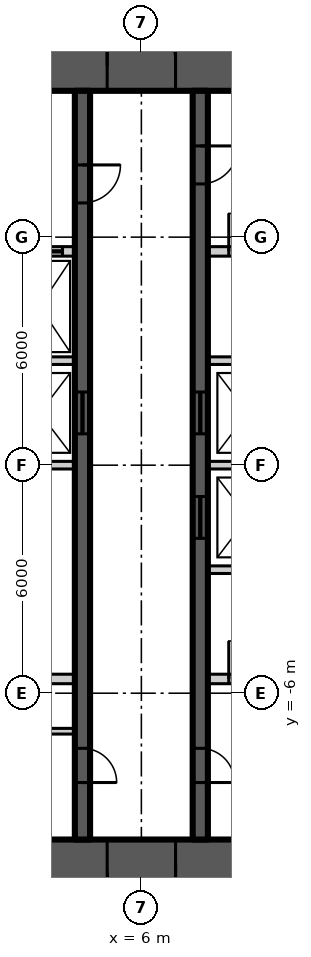
"""IFC4 building model, lengths in metres.
Left out: names, types, materials, properties, quantities, classifications, styles, units other than length and angle.
Written with IfcOpenShell. Run it as: python <this file> out.ifc"""

import sys

from ifc_helpers import new_model, si_unit, direction, frame, frame_2d, origin, place, context, subcontext, project, spatial, rectangle, extrude, element, fill, save


model = new_model("IFC4")
c1 = context("Model", 3, precision=1e-05, world=origin(), true_north=direction((0.0, 1.0)))
c2 = subcontext(c1, "Body", "Model", "MODEL_VIEW")
j1 = project(units=[si_unit("LENGTHUNIT", "METRE"), si_unit("PLANEANGLEUNIT", "RADIAN")], contexts=[c1])
p1 = place(None, origin())
s1 = spatial("IfcSite", under=j1, at=p1, CompositionType="ELEMENT")
p2 = place(p1, origin())
s2 = spatial("IfcBuilding", under=s1, at=p2, CompositionType="ELEMENT")
p3 = place(p2, frame((0.0, 0.0, 290.7)))
s3 = spatial("IfcBuildingStorey", under=s2, at=p3, CompositionType="ELEMENT", Elevation=290.7)
p4 = place(p3, frame((-11.15, 10.5, 0.0), z_axis=(0.0, 0.0, 1.0), x_axis=(1.0, 0.0, 0.0)))
e1 = element("IfcWall", 1, at=p4, inside=s3, PredefinedType="SHEAR", context=c2, shape_type="SweptSolid", body=[
    extrude(rectangle(XDim=22.3, YDim=1.3, at=frame_2d((11.15, 0.0))), origin(), (0.0, 0.0, 1.0), 3.9),
])
p5 = place(p4, frame((4.25, 0.0, 0.0)))
e2 = element("IfcOpeningElement", 2, at=p5, cuts=e1, PredefinedType="OPENING", context=c2, shape_type="SweptSolid", body=[
    extrude(rectangle(XDim=1.8, YDim=2.2, at=frame_2d((0.9, 1.1))), frame((0.0, 0.66, 0.0), z_axis=(0.0, -1.0, 0.0), x_axis=(1.0, 0.0, 0.0)), (0.0, 0.0, 1.0), 1.32),
])
p6 = place(p4, frame((16.25, 0.0, 0.0)))
e3 = element("IfcOpeningElement", 3, at=p6, cuts=e1, PredefinedType="OPENING", context=c2, shape_type="SweptSolid", body=[
    extrude(rectangle(XDim=1.8, YDim=2.2, at=frame_2d((0.9, 1.1))), frame((0.0, 0.66, 0.0), z_axis=(0.0, -1.0, 0.0), x_axis=(1.0, 0.0, 0.0)), (0.0, 0.0, 1.0), 1.32),
])
p7 = place(p3, frame((11.15, -10.5, 0.0), z_axis=(0.0, 0.0, 1.0), x_axis=(-1.0, 0.0, 0.0)))
e4 = element("IfcWall", 4, at=p7, inside=s3, PredefinedType="SHEAR", context=c2, shape_type="SweptSolid", body=[
    extrude(rectangle(XDim=22.3, YDim=1.3, at=frame_2d((11.15, 0.0))), origin(), (0.0, 0.0, 1.0), 3.9),
])
p8 = place(p7, frame((16.25, 0.0, 0.0)))
e5 = element("IfcOpeningElement", 5, at=p8, cuts=e4, PredefinedType="OPENING", context=c2, shape_type="SweptSolid", body=[
    extrude(rectangle(XDim=1.8, YDim=2.2, at=frame_2d((0.9, 1.1))), frame((0.0, 0.66, 0.0), z_axis=(0.0, -1.0, 0.0), x_axis=(1.0, 0.0, 0.0)), (0.0, 0.0, 1.0), 1.32),
])
p9 = place(p7, frame((4.25, 0.0, 0.0)))
e6 = element("IfcOpeningElement", 6, at=p9, cuts=e4, PredefinedType="OPENING", context=c2, shape_type="SweptSolid", body=[
    extrude(rectangle(XDim=1.8, YDim=2.2, at=frame_2d((0.9, 1.1))), frame((0.0, 0.66, 0.0), z_axis=(0.0, -1.0, 0.0), x_axis=(1.0, 0.0, 0.0)), (0.0, 0.0, 1.0), 1.32),
])
p10 = place(p3, frame((7.55, 9.85, 0.0), z_axis=(0.0, 0.0, 1.0), x_axis=(0.0, -1.0, 0.0)))
e7 = element("IfcWall", 7, at=p10, inside=s3, PredefinedType="SHEAR", context=c2, shape_type="SweptSolid", body=[
    extrude(rectangle(XDim=19.7, YDim=0.4, at=frame_2d((9.85, 0.0))), origin(), (0.0, 0.0, 1.0), 3.9),
])
p11 = place(p10, frame((1.45, 0.0, 0.0)))
e8 = element("IfcOpeningElement", 8, at=p11, cuts=e7, PredefinedType="OPENING", context=c2, shape_type="SweptSolid", body=[
    extrude(rectangle(XDim=1.0, YDim=2.2, at=frame_2d((0.5, 1.1))), frame((0.0, 0.21, 0.0), z_axis=(0.0, -1.0, 0.0), x_axis=(1.0, 0.0, 0.0)), (0.0, 0.0, 1.0), 0.42),
])
p12 = place(p10, frame((17.3, 0.0, 0.0)))
e9 = element("IfcOpeningElement", 9, at=p12, cuts=e7, PredefinedType="OPENING", context=c2, shape_type="SweptSolid", body=[
    extrude(rectangle(XDim=0.9, YDim=2.1, at=frame_2d((0.45, 1.05))), frame((0.0, 0.21, 0.0), z_axis=(0.0, -1.0, 0.0), x_axis=(1.0, 0.0, 0.0)), (0.0, 0.0, 1.0), 0.42),
])
p13 = place(p10, frame((7.925, 0.0, 0.0)))
e10 = element("IfcOpeningElement", 10, at=p13, cuts=e7, PredefinedType="OPENING", context=c2, shape_type="SweptSolid", body=[
    extrude(rectangle(XDim=1.1, YDim=2.2, at=frame_2d((0.55, 1.1))), frame((0.0, 0.21, 0.0), z_axis=(0.0, -1.0, 0.0), x_axis=(1.0, 0.0, 0.0)), (0.0, 0.0, 1.0), 0.42),
])
p14 = place(p10, frame((10.675, 0.0, 0.0)))
e11 = element("IfcOpeningElement", 11, at=p14, cuts=e7, PredefinedType="OPENING", context=c2, shape_type="SweptSolid", body=[
    extrude(rectangle(XDim=1.1, YDim=2.2, at=frame_2d((0.55, 1.1))), frame((0.0, 0.21, 0.0), z_axis=(0.0, -1.0, 0.0), x_axis=(1.0, 0.0, 0.0)), (0.0, 0.0, 1.0), 0.42),
])
p15 = place(p3, frame((4.45, 9.85, 0.0), z_axis=(0.0, 0.0, 1.0), x_axis=(0.0, -1.0, 0.0)))
e12 = element("IfcWall", 12, at=p15, inside=s3, PredefinedType="SHEAR", context=c2, shape_type="SweptSolid", body=[
    extrude(rectangle(XDim=19.7, YDim=0.4, at=frame_2d((9.85, 0.0))), origin(), (0.0, 0.0, 1.0), 3.9),
])
p16 = place(p15, frame((1.95, 0.0, 0.0)))
e13 = element("IfcOpeningElement", 13, at=p16, cuts=e12, PredefinedType="OPENING", context=c2, shape_type="SweptSolid", body=[
    extrude(rectangle(XDim=1.0, YDim=2.2, at=frame_2d((0.5, 1.1))), frame((0.0, 0.21, 0.0), z_axis=(0.0, -1.0, 0.0), x_axis=(1.0, 0.0, 0.0)), (0.0, 0.0, 1.0), 0.42),
])
p17 = place(p15, frame((17.3, 0.0, 0.0)))
e14 = element("IfcOpeningElement", 14, at=p17, cuts=e12, PredefinedType="OPENING", context=c2, shape_type="SweptSolid", body=[
    extrude(rectangle(XDim=0.9, YDim=2.1, at=frame_2d((0.45, 1.05))), frame((0.0, 0.21, 0.0), z_axis=(0.0, -1.0, 0.0), x_axis=(1.0, 0.0, 0.0)), (0.0, 0.0, 1.0), 0.42),
])
p18 = place(p15, frame((7.925, 0.0, 0.0)))
e15 = element("IfcOpeningElement", 15, at=p18, cuts=e12, PredefinedType="OPENING", context=c2, shape_type="SweptSolid", body=[
    extrude(rectangle(XDim=1.1, YDim=2.2, at=frame_2d((0.55, 1.1))), frame((0.0, 0.21, 0.0), z_axis=(0.0, -1.0, 0.0), x_axis=(1.0, 0.0, 0.0)), (0.0, 0.0, 1.0), 0.42),
])
p19 = place(p3, frame((2.4, 5.625, 0.0), z_axis=(0.0, 0.0, 1.0), x_axis=(1.0, 0.0, 0.0)))
e16 = element("IfcWall", 16, at=p19, inside=s3, PredefinedType="SOLIDWALL", context=c2, shape_type="SweptSolid", body=[
    extrude(rectangle(XDim=1.85, YDim=0.25, at=frame_2d((0.925, 0.0))), origin(), (0.0, 0.0, 1.0), 3.7),
])
p20 = place(p19, frame((0.325, 0.0, 0.0)))
e17 = element("IfcOpeningElement", 17, at=p20, cuts=e16, PredefinedType="OPENING", context=c2, shape_type="SweptSolid", body=[
    extrude(rectangle(XDim=1.2, YDim=2.2, at=frame_2d((0.6, 1.1))), frame((0.0, 0.135, 0.0), z_axis=(0.0, -1.0, 0.0), x_axis=(1.0, 0.0, 0.0)), (0.0, 0.0, 1.0), 0.27),
])
p21 = place(p3, frame((7.75, 5.625, 0.0), z_axis=(0.0, 0.0, 1.0), x_axis=(1.0, 0.0, 0.0)))
e18 = element("IfcWall", 18, at=p21, inside=s3, PredefinedType="SOLIDWALL", context=c2, shape_type="SweptSolid", body=[
    extrude(rectangle(XDim=2.1, YDim=0.25, at=frame_2d((1.05, 0.0))), origin(), (0.0, 0.0, 1.0), 3.7),
])
p22 = place(p21, frame((0.55, 0.0, 0.0)))
e19 = element("IfcOpeningElement", 19, at=p22, cuts=e18, PredefinedType="OPENING", context=c2, shape_type="SweptSolid", body=[
    extrude(rectangle(XDim=1.0, YDim=2.2, at=frame_2d((0.5, 1.1))), frame((0.0, 0.135, 0.0), z_axis=(0.0, -1.0, 0.0), x_axis=(1.0, 0.0, 0.0)), (0.0, 0.0, 1.0), 0.27),
])
p23 = place(p3, frame((2.4, -5.625, 0.0), z_axis=(0.0, 0.0, 1.0), x_axis=(1.0, 0.0, 0.0)))
e20 = element("IfcWall", 20, at=p23, inside=s3, PredefinedType="SOLIDWALL", context=c2, shape_type="SweptSolid", body=[
    extrude(rectangle(XDim=1.85, YDim=0.25, at=frame_2d((0.925, 0.0))), origin(), (0.0, 0.0, 1.0), 3.7),
])
p24 = place(p3, frame((7.75, -5.625, 0.0), z_axis=(0.0, 0.0, 1.0), x_axis=(1.0, 0.0, 0.0)))
e21 = element("IfcWall", 21, at=p24, inside=s3, PredefinedType="SOLIDWALL", context=c2, shape_type="SweptSolid", body=[
    extrude(rectangle(XDim=2.1, YDim=0.25, at=frame_2d((1.05, 0.0))), origin(), (0.0, 0.0, 1.0), 3.7),
])
p25 = place(p24, frame((0.55, 0.0, 0.0)))
e22 = element("IfcOpeningElement", 22, at=p25, cuts=e21, PredefinedType="OPENING", context=c2, shape_type="SweptSolid", body=[
    extrude(rectangle(XDim=1.0, YDim=2.2, at=frame_2d((0.5, 1.1))), frame((0.0, 0.135, 0.0), z_axis=(0.0, -1.0, 0.0), x_axis=(1.0, 0.0, 0.0)), (0.0, 0.0, 1.0), 0.27),
])
p26 = place(p3, frame((7.75, -2.75, 0.0), z_axis=(0.0, 0.0, 1.0), x_axis=(1.0, 0.0, 0.0)))
e23 = element("IfcWall", 23, at=p26, inside=s3, PredefinedType="SOLIDWALL", context=c2, shape_type="SweptSolid", body=[
    extrude(rectangle(XDim=2.1, YDim=0.2, at=frame_2d((1.05, 0.0))), origin(), (0.0, 0.0, 1.0), 3.7),
])
p27 = place(p3, frame((2.4, 0.0, 0.0), z_axis=(0.0, 0.0, 1.0), x_axis=(1.0, 0.0, 0.0)))
e24 = element("IfcWall", 24, at=p27, inside=s3, PredefinedType="SOLIDWALL", context=c2, shape_type="SweptSolid", body=[
    extrude(rectangle(XDim=1.85, YDim=0.2, at=frame_2d((0.925, 0.0))), origin(), (0.0, 0.0, 1.0), 3.7),
])
p28 = place(p3, frame((7.75, 0.0, 0.0), z_axis=(0.0, 0.0, 1.0), x_axis=(1.0, 0.0, 0.0)))
e25 = element("IfcWall", 25, at=p28, inside=s3, PredefinedType="SOLIDWALL", context=c2, shape_type="SweptSolid", body=[
    extrude(rectangle(XDim=2.1, YDim=0.2, at=frame_2d((1.05, 0.0))), origin(), (0.0, 0.0, 1.0), 3.7),
])
p29 = place(p3, frame((2.4, 2.75, 0.0), z_axis=(0.0, 0.0, 1.0), x_axis=(1.0, 0.0, 0.0)))
e26 = element("IfcWall", 26, at=p29, inside=s3, PredefinedType="SOLIDWALL", context=c2, shape_type="SweptSolid", body=[
    extrude(rectangle(XDim=1.85, YDim=0.2, at=frame_2d((0.925, 0.0))), origin(), (0.0, 0.0, 1.0), 3.7),
])
p30 = place(p3, frame((7.75, 2.75, 0.0), z_axis=(0.0, 0.0, 1.0), x_axis=(1.0, 0.0, 0.0)))
e27 = element("IfcWall", 27, at=p30, inside=s3, PredefinedType="SOLIDWALL", context=c2, shape_type="SweptSolid", body=[
    extrude(rectangle(XDim=2.1, YDim=0.2, at=frame_2d((1.05, 0.0))), origin(), (0.0, 0.0, 1.0), 3.7),
])
p31 = place(p3, frame((2.4, -7.0, 0.0), z_axis=(0.0, 0.0, 1.0), x_axis=(1.0, 0.0, 0.0)))
e28 = element("IfcWall", 28, at=p31, inside=s3, PredefinedType="SOLIDWALL", context=c2, shape_type="SweptSolid", body=[
    extrude(rectangle(XDim=1.85, YDim=0.15, at=frame_2d((0.925, 0.0))), origin(), (0.0, 0.0, 1.0), 3.77),
])
p32 = place(p31, frame((0.1, 0.0, 0.0)))
e29 = element("IfcOpeningElement", 29, at=p32, cuts=e28, PredefinedType="OPENING", context=c2, shape_type="SweptSolid", body=[
    extrude(rectangle(XDim=0.9, YDim=2.1, at=frame_2d((0.45, 1.05))), frame((0.0, 0.085, 0.0), z_axis=(0.0, -1.0, 0.0), x_axis=(1.0, 0.0, 0.0)), (0.0, 0.0, 1.0), 0.17),
])
p33 = place(p6, origin())
e30 = element("IfcDoor", 30, at=p33, inside=s3, OperationType="DOUBLE_DOOR_DOUBLE_SWING", PredefinedType="DOOR", context=c2, shape_type="SweptSolid", body=[
    extrude(rectangle(XDim=1.8, YDim=2.2, at=frame_2d((0.9, 1.1))), frame((0.0, 0.025, 0.0), z_axis=(0.0, -1.0, 0.0), x_axis=(1.0, 0.0, 0.0)), (0.0, 0.0, 1.0), 0.05),
])
fill(e3, e30)
p34 = place(p9, origin())
e31 = element("IfcDoor", 31, at=p34, inside=s3, OperationType="DOUBLE_DOOR_DOUBLE_SWING", PredefinedType="DOOR", context=c2, shape_type="SweptSolid", body=[
    extrude(rectangle(XDim=1.8, YDim=2.2, at=frame_2d((0.9, 1.1))), frame((0.0, 0.025, 0.0), z_axis=(0.0, -1.0, 0.0), x_axis=(1.0, 0.0, 0.0)), (0.0, 0.0, 1.0), 0.05),
])
fill(e6, e31)
p35 = place(p11, origin())
e32 = element("IfcDoor", 32, at=p35, inside=s3, OperationType="SINGLE_SWING_LEFT", PredefinedType="DOOR", context=c2, shape_type="SweptSolid", body=[
    extrude(rectangle(XDim=1.0, YDim=2.2, at=frame_2d((0.5, 1.1))), frame((0.0, 0.025, 0.0), z_axis=(0.0, -1.0, 0.0), x_axis=(1.0, 0.0, 0.0)), (0.0, 0.0, 1.0), 0.05),
])
fill(e8, e32)
p36 = place(p16, origin())
e33 = element("IfcDoor", 33, at=p36, inside=s3, OperationType="SINGLE_SWING_LEFT", PredefinedType="DOOR", context=c2, shape_type="SweptSolid", body=[
    extrude(rectangle(XDim=1.0, YDim=2.2, at=frame_2d((0.5, 1.1))), frame((0.0, 0.025, 0.0), z_axis=(0.0, -1.0, 0.0), x_axis=(1.0, 0.0, 0.0)), (0.0, 0.0, 1.0), 0.05),
])
fill(e13, e33)
p37 = place(p12, origin())
e34 = element("IfcDoor", 34, at=p37, inside=s3, OperationType="SINGLE_SWING_RIGHT", PredefinedType="DOOR", context=c2, shape_type="SweptSolid", body=[
    extrude(rectangle(XDim=0.9, YDim=2.1, at=frame_2d((0.45, 1.05))), frame((0.0, 0.025, 0.0), z_axis=(0.0, -1.0, 0.0), x_axis=(1.0, 0.0, 0.0)), (0.0, 0.0, 1.0), 0.05),
])
fill(e9, e34)
p38 = place(p17, origin())
e35 = element("IfcDoor", 35, at=p38, inside=s3, OperationType="SINGLE_SWING_RIGHT", PredefinedType="DOOR", context=c2, shape_type="SweptSolid", body=[
    extrude(rectangle(XDim=0.9, YDim=2.1, at=frame_2d((0.45, 1.05))), frame((0.0, 0.025, 0.0), z_axis=(0.0, -1.0, 0.0), x_axis=(1.0, 0.0, 0.0)), (0.0, 0.0, 1.0), 0.05),
])
fill(e14, e35)
p39 = place(p13, origin())
e36 = element("IfcDoor", 36, at=p39, inside=s3, OperationType="SLIDING_TO_LEFT", PredefinedType="DOOR", context=c2, shape_type="SweptSolid", body=[
    extrude(rectangle(XDim=1.1, YDim=2.2, at=frame_2d((0.55, 1.1))), frame((0.0, 0.025, 0.0), z_axis=(0.0, -1.0, 0.0), x_axis=(1.0, 0.0, 0.0)), (0.0, 0.0, 1.0), 0.05),
])
fill(e10, e36)
p40 = place(p14, origin())
e37 = element("IfcDoor", 37, at=p40, inside=s3, OperationType="SLIDING_TO_LEFT", PredefinedType="DOOR", context=c2, shape_type="SweptSolid", body=[
    extrude(rectangle(XDim=1.1, YDim=2.2, at=frame_2d((0.55, 1.1))), frame((0.0, 0.025, 0.0), z_axis=(0.0, -1.0, 0.0), x_axis=(1.0, 0.0, 0.0)), (0.0, 0.0, 1.0), 0.05),
])
fill(e11, e37)
p41 = place(p18, origin())
e38 = element("IfcDoor", 38, at=p41, inside=s3, OperationType="SLIDING_TO_LEFT", PredefinedType="DOOR", context=c2, shape_type="SweptSolid", body=[
    extrude(rectangle(XDim=1.1, YDim=2.2, at=frame_2d((0.55, 1.1))), frame((0.0, 0.025, 0.0), z_axis=(0.0, -1.0, 0.0), x_axis=(1.0, 0.0, 0.0)), (0.0, 0.0, 1.0), 0.05),
])
fill(e15, e38)
p42 = place(p20, origin())
e39 = element("IfcDoor", 39, at=p42, inside=s3, OperationType="SLIDING_TO_LEFT", PredefinedType="DOOR", context=c2, shape_type="SweptSolid", body=[
    extrude(rectangle(XDim=1.2, YDim=2.2, at=frame_2d((0.6, 1.1))), frame((0.0, 0.025, 0.0), z_axis=(0.0, -1.0, 0.0), x_axis=(1.0, 0.0, 0.0)), (0.0, 0.0, 1.0), 0.05),
])
fill(e17, e39)
p43 = place(p22, origin())
e40 = element("IfcDoor", 40, at=p43, inside=s3, OperationType="SINGLE_SWING_LEFT", PredefinedType="DOOR", context=c2, shape_type="SweptSolid", body=[
    extrude(rectangle(XDim=1.0, YDim=2.2, at=frame_2d((0.5, 1.1))), frame((0.0, 0.025, 0.0), z_axis=(0.0, -1.0, 0.0), x_axis=(1.0, 0.0, 0.0)), (0.0, 0.0, 1.0), 0.05),
])
fill(e19, e40)
p44 = place(p25, origin())
e41 = element("IfcDoor", 41, at=p44, inside=s3, OperationType="SINGLE_SWING_LEFT", PredefinedType="DOOR", context=c2, shape_type="SweptSolid", body=[
    extrude(rectangle(XDim=1.0, YDim=2.2, at=frame_2d((0.5, 1.1))), frame((0.0, 0.025, 0.0), z_axis=(0.0, -1.0, 0.0), x_axis=(1.0, 0.0, 0.0)), (0.0, 0.0, 1.0), 0.05),
])
fill(e22, e41)
save(model, sys.argv[1])
